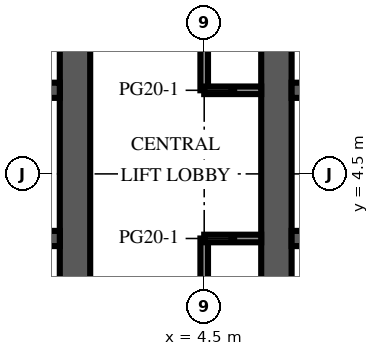
"""IFC4 building model, lengths in metres.
Left out: names, types, materials, properties, quantities, classifications, styles, units other than length and angle.
Written with IfcOpenShell. Run it as: python <this file> out.ifc"""

import sys

from ifc_helpers import new_model, si_unit, direction, frame, frame_2d, origin, place, context, subcontext, project, spatial, rectangle, extrude, element, fill, save


model = new_model("IFC4")
c1 = context("Model", 3, precision=1e-05, world=origin(), true_north=direction((0.0, 1.0)))
c2 = subcontext(c1, "Body", "Model", "MODEL_VIEW")
j1 = project(units=[si_unit("LENGTHUNIT", "METRE"), si_unit("PLANEANGLEUNIT", "RADIAN")], contexts=[c1])
p1 = place(None, origin())
s1 = spatial("IfcSite", under=j1, at=p1, CompositionType="ELEMENT")
p2 = place(p1, origin())
s2 = spatial("IfcBuilding", under=s1, at=p2, CompositionType="ELEMENT")
p3 = place(p2, frame((0.0, 0.0, 191.5)))
s3 = spatial("IfcBuildingStorey", under=s2, at=p3, CompositionType="ELEMENT", Elevation=191.5)
p4 = place(p3, frame((1.1, -9.0, 0.0), z_axis=(0.0, 0.0, 1.0), x_axis=(0.0, 1.0, 0.0)))
e1 = element("IfcWall", 1, at=p4, inside=s3, PredefinedType="SHEAR", context=c2, shape_type="SweptSolid", body=[
    extrude(rectangle(XDim=27.5, YDim=0.8, at=frame_2d((13.75, 0.0))), origin(), (0.0, 0.0, 1.0), 4.1),
])
p5 = place(p4, frame((12.55, 0.0, 0.0)))
e2 = element("IfcOpeningElement", 2, at=p5, cuts=e1, PredefinedType="OPENING", context=c2, shape_type="SweptSolid", body=[
    extrude(rectangle(XDim=2.4, YDim=2.4, at=frame_2d((1.2, 1.2))), frame((0.0, 0.41, 0.0), z_axis=(0.0, -1.0, 0.0), x_axis=(1.0, 0.0, 0.0)), (0.0, 0.0, 1.0), 0.82),
])
p6 = place(p4, frame((3.95, 0.0, 0.0)))
e3 = element("IfcOpeningElement", 3, at=p6, cuts=e1, PredefinedType="OPENING", context=c2, shape_type="SweptSolid", body=[
    extrude(rectangle(XDim=1.2, YDim=2.1, at=frame_2d((0.6, 1.05))), frame((0.0, 0.41, 0.0), z_axis=(0.0, -1.0, 0.0), x_axis=(1.0, 0.0, 0.0)), (0.0, 0.0, 1.0), 0.82),
])
p7 = place(p4, frame((19.45, 0.0, 0.0)))
e4 = element("IfcOpeningElement", 4, at=p7, cuts=e1, PredefinedType="OPENING", context=c2, shape_type="SweptSolid", body=[
    extrude(rectangle(XDim=1.0, YDim=2.1, at=frame_2d((0.5, 1.05))), frame((0.0, 0.41, 0.0), z_axis=(0.0, -1.0, 0.0), x_axis=(1.0, 0.0, 0.0)), (0.0, 0.0, 1.0), 0.82),
])
p8 = place(p4, frame((21.137, 0.0, 0.0)))
e5 = element("IfcOpeningElement", 5, at=p8, cuts=e1, PredefinedType="OPENING", context=c2, shape_type="SweptSolid", body=[
    extrude(rectangle(XDim=1.0, YDim=2.1, at=frame_2d((0.5, 1.05))), frame((0.0, 0.41, 0.0), z_axis=(0.0, -1.0, 0.0), x_axis=(1.0, 0.0, 0.0)), (0.0, 0.0, 1.0), 0.82),
])
p9 = place(p4, frame((23.2, 0.0, 0.0)))
e6 = element("IfcOpeningElement", 6, at=p9, cuts=e1, PredefinedType="OPENING", context=c2, shape_type="SweptSolid", body=[
    extrude(rectangle(XDim=1.0, YDim=2.1, at=frame_2d((0.5, 1.05))), frame((0.0, 0.41, 0.0), z_axis=(0.0, -1.0, 0.0), x_axis=(1.0, 0.0, 0.0)), (0.0, 0.0, 1.0), 0.82),
])
p10 = place(p4, frame((25.262, 0.0, 0.0)))
e7 = element("IfcOpeningElement", 7, at=p10, cuts=e1, PredefinedType="OPENING", context=c2, shape_type="SweptSolid", body=[
    extrude(rectangle(XDim=1.0, YDim=2.1, at=frame_2d((0.5, 1.05))), frame((0.0, 0.41, 0.0), z_axis=(0.0, -1.0, 0.0), x_axis=(1.0, 0.0, 0.0)), (0.0, 0.0, 1.0), 0.82),
])
p11 = place(p3, frame((-9.7, 2.8, 0.0), z_axis=(0.0, 0.0, 1.0), x_axis=(1.0, 0.0, 0.0)))
e8 = element("IfcWall", 8, at=p11, inside=s3, PredefinedType="SHEAR", context=c2, shape_type="SweptSolid", body=[
    extrude(rectangle(XDim=10.4, YDim=0.4, at=frame_2d((5.2, 0.0))), origin(), (0.0, 0.0, 1.0), 4.1),
])
p12 = place(p11, frame((0.738, 0.0, 0.0)))
e9 = element("IfcOpeningElement", 9, at=p12, cuts=e8, PredefinedType="OPENING", context=c2, shape_type="SweptSolid", body=[
    extrude(rectangle(XDim=1.1, YDim=2.1, at=frame_2d((0.55, 1.05))), frame((0.0, 0.21, 0.0), z_axis=(0.0, -1.0, 0.0), x_axis=(1.0, 0.0, 0.0)), (0.0, 0.0, 1.0), 0.42),
])
p13 = place(p11, frame((3.337, 0.0, 0.0)))
e10 = element("IfcOpeningElement", 10, at=p13, cuts=e8, PredefinedType="OPENING", context=c2, shape_type="SweptSolid", body=[
    extrude(rectangle(XDim=1.1, YDim=2.1, at=frame_2d((0.55, 1.05))), frame((0.0, 0.21, 0.0), z_axis=(0.0, -1.0, 0.0), x_axis=(1.0, 0.0, 0.0)), (0.0, 0.0, 1.0), 0.42),
])
p14 = place(p11, frame((6.012, 0.0, 0.0)))
e11 = element("IfcOpeningElement", 11, at=p14, cuts=e8, PredefinedType="OPENING", context=c2, shape_type="SweptSolid", body=[
    extrude(rectangle(XDim=1.0, YDim=2.1, at=frame_2d((0.5, 1.05))), frame((0.0, 0.21, 0.0), z_axis=(0.0, -1.0, 0.0), x_axis=(1.0, 0.0, 0.0)), (0.0, 0.0, 1.0), 0.42),
])
p15 = place(p11, frame((8.613, 0.0, 0.0)))
e12 = element("IfcOpeningElement", 12, at=p15, cuts=e8, PredefinedType="OPENING", context=c2, shape_type="SweptSolid", body=[
    extrude(rectangle(XDim=1.0, YDim=2.1, at=frame_2d((0.5, 1.05))), frame((0.0, 0.21, 0.0), z_axis=(0.0, -1.0, 0.0), x_axis=(1.0, 0.0, 0.0)), (0.0, 0.0, 1.0), 0.42),
])
p16 = place(p3, frame((-9.7, 6.7, 0.0), z_axis=(0.0, 0.0, 1.0), x_axis=(1.0, 0.0, 0.0)))
e13 = element("IfcWall", 13, at=p16, inside=s3, PredefinedType="SHEAR", context=c2, shape_type="SweptSolid", body=[
    extrude(rectangle(XDim=10.4, YDim=0.4, at=frame_2d((5.2, 0.0))), origin(), (0.0, 0.0, 1.0), 4.1),
])
p17 = place(p16, frame((3.337, 0.0, 0.0)))
e14 = element("IfcOpeningElement", 14, at=p17, cuts=e13, PredefinedType="OPENING", context=c2, shape_type="SweptSolid", body=[
    extrude(rectangle(XDim=1.1, YDim=2.1, at=frame_2d((0.55, 1.05))), frame((0.0, 0.21, 0.0), z_axis=(0.0, -1.0, 0.0), x_axis=(1.0, 0.0, 0.0)), (0.0, 0.0, 1.0), 0.42),
])
p18 = place(p16, frame((5.962, 0.0, 0.0)))
e15 = element("IfcOpeningElement", 15, at=p18, cuts=e13, PredefinedType="OPENING", context=c2, shape_type="SweptSolid", body=[
    extrude(rectangle(XDim=1.1, YDim=2.1, at=frame_2d((0.55, 1.05))), frame((0.0, 0.21, 0.0), z_axis=(0.0, -1.0, 0.0), x_axis=(1.0, 0.0, 0.0)), (0.0, 0.0, 1.0), 0.42),
])
p19 = place(p16, frame((8.663, 0.0, 0.0)))
e16 = element("IfcOpeningElement", 16, at=p19, cuts=e13, PredefinedType="OPENING", context=c2, shape_type="SweptSolid", body=[
    extrude(rectangle(XDim=1.1, YDim=2.1, at=frame_2d((0.55, 1.05))), frame((0.0, 0.21, 0.0), z_axis=(0.0, -1.0, 0.0), x_axis=(1.0, 0.0, 0.0)), (0.0, 0.0, 1.0), 0.42),
])
p20 = place(p16, frame((0.688, 0.0, 0.0)))
e17 = element("IfcOpeningElement", 17, at=p20, cuts=e13, PredefinedType="OPENING", context=c2, shape_type="SweptSolid", body=[
    extrude(rectangle(XDim=1.0, YDim=2.1, at=frame_2d((0.5, 1.05))), frame((0.0, 0.21, 0.0), z_axis=(0.0, -1.0, 0.0), x_axis=(1.0, 0.0, 0.0)), (0.0, 0.0, 1.0), 0.42),
])
p21 = place(p3, frame((6.4, -9.0, 0.0), z_axis=(0.0, 0.0, 1.0), x_axis=(0.0, 1.0, 0.0)))
e18 = element("IfcWall", 18, at=p21, inside=s3, PredefinedType="SHEAR", context=c2, shape_type="SweptSolid", body=[
    extrude(rectangle(XDim=27.5, YDim=0.8, at=frame_2d((13.75, 0.0))), origin(), (0.0, 0.0, 1.0), 4.1),
])
p22 = place(p21, frame((12.55, 0.0, 0.0)))
e19 = element("IfcOpeningElement", 19, at=p22, cuts=e18, PredefinedType="OPENING", context=c2, shape_type="SweptSolid", body=[
    extrude(rectangle(XDim=2.4, YDim=2.4, at=frame_2d((1.2, 1.2))), frame((0.0, 0.41, 0.0), z_axis=(0.0, -1.0, 0.0), x_axis=(1.0, 0.0, 0.0)), (0.0, 0.0, 1.0), 0.82),
])
p23 = place(p21, frame((3.95, 0.0, 0.0)))
e20 = element("IfcOpeningElement", 20, at=p23, cuts=e18, PredefinedType="OPENING", context=c2, shape_type="SweptSolid", body=[
    extrude(rectangle(XDim=1.2, YDim=2.1, at=frame_2d((0.6, 1.05))), frame((0.0, 0.41, 0.0), z_axis=(0.0, -1.0, 0.0), x_axis=(1.0, 0.0, 0.0)), (0.0, 0.0, 1.0), 0.82),
])
p24 = place(p21, frame((19.45, 0.0, 0.0)))
e21 = element("IfcOpeningElement", 21, at=p24, cuts=e18, PredefinedType="OPENING", context=c2, shape_type="SweptSolid", body=[
    extrude(rectangle(XDim=1.0, YDim=2.1, at=frame_2d((0.5, 1.05))), frame((0.0, 0.41, 0.0), z_axis=(0.0, -1.0, 0.0), x_axis=(1.0, 0.0, 0.0)), (0.0, 0.0, 1.0), 0.82),
])
p25 = place(p21, frame((21.137, 0.0, 0.0)))
e22 = element("IfcOpeningElement", 22, at=p25, cuts=e18, PredefinedType="OPENING", context=c2, shape_type="SweptSolid", body=[
    extrude(rectangle(XDim=1.0, YDim=2.1, at=frame_2d((0.5, 1.05))), frame((0.0, 0.41, 0.0), z_axis=(0.0, -1.0, 0.0), x_axis=(1.0, 0.0, 0.0)), (0.0, 0.0, 1.0), 0.82),
])
p26 = place(p21, frame((23.2, 0.0, 0.0)))
e23 = element("IfcOpeningElement", 23, at=p26, cuts=e18, PredefinedType="OPENING", context=c2, shape_type="SweptSolid", body=[
    extrude(rectangle(XDim=1.0, YDim=2.1, at=frame_2d((0.5, 1.05))), frame((0.0, 0.41, 0.0), z_axis=(0.0, -1.0, 0.0), x_axis=(1.0, 0.0, 0.0)), (0.0, 0.0, 1.0), 0.82),
])
p27 = place(p21, frame((25.262, 0.0, 0.0)))
e24 = element("IfcOpeningElement", 24, at=p27, cuts=e18, PredefinedType="OPENING", context=c2, shape_type="SweptSolid", body=[
    extrude(rectangle(XDim=1.0, YDim=2.1, at=frame_2d((0.5, 1.05))), frame((0.0, 0.41, 0.0), z_axis=(0.0, -1.0, 0.0), x_axis=(1.0, 0.0, 0.0)), (0.0, 0.0, 1.0), 0.82),
])
p28 = place(p3, frame((6.8, 2.8, 0.0), z_axis=(0.0, 0.0, 1.0), x_axis=(1.0, 0.0, 0.0)))
e25 = element("IfcWall", 25, at=p28, inside=s3, PredefinedType="SHEAR", context=c2, shape_type="SweptSolid", body=[
    extrude(rectangle(XDim=10.4, YDim=0.4, at=frame_2d((5.2, 0.0))), origin(), (0.0, 0.0, 1.0), 4.1),
])
p29 = place(p28, frame((0.738, 0.0, 0.0)))
e26 = element("IfcOpeningElement", 26, at=p29, cuts=e25, PredefinedType="OPENING", context=c2, shape_type="SweptSolid", body=[
    extrude(rectangle(XDim=1.1, YDim=2.1, at=frame_2d((0.55, 1.05))), frame((0.0, 0.21, 0.0), z_axis=(0.0, -1.0, 0.0), x_axis=(1.0, 0.0, 0.0)), (0.0, 0.0, 1.0), 0.42),
])
p30 = place(p28, frame((3.337, 0.0, 0.0)))
e27 = element("IfcOpeningElement", 27, at=p30, cuts=e25, PredefinedType="OPENING", context=c2, shape_type="SweptSolid", body=[
    extrude(rectangle(XDim=1.1, YDim=2.1, at=frame_2d((0.55, 1.05))), frame((0.0, 0.21, 0.0), z_axis=(0.0, -1.0, 0.0), x_axis=(1.0, 0.0, 0.0)), (0.0, 0.0, 1.0), 0.42),
])
p31 = place(p28, frame((6.012, 0.0, 0.0)))
e28 = element("IfcOpeningElement", 28, at=p31, cuts=e25, PredefinedType="OPENING", context=c2, shape_type="SweptSolid", body=[
    extrude(rectangle(XDim=1.0, YDim=2.1, at=frame_2d((0.5, 1.05))), frame((0.0, 0.21, 0.0), z_axis=(0.0, -1.0, 0.0), x_axis=(1.0, 0.0, 0.0)), (0.0, 0.0, 1.0), 0.42),
])
p32 = place(p28, frame((8.613, 0.0, 0.0)))
e29 = element("IfcOpeningElement", 29, at=p32, cuts=e25, PredefinedType="OPENING", context=c2, shape_type="SweptSolid", body=[
    extrude(rectangle(XDim=1.0, YDim=2.1, at=frame_2d((0.5, 1.05))), frame((0.0, 0.21, 0.0), z_axis=(0.0, -1.0, 0.0), x_axis=(1.0, 0.0, 0.0)), (0.0, 0.0, 1.0), 0.42),
])
p33 = place(p3, frame((6.8, 6.7, 0.0), z_axis=(0.0, 0.0, 1.0), x_axis=(1.0, 0.0, 0.0)))
e30 = element("IfcWall", 30, at=p33, inside=s3, PredefinedType="SHEAR", context=c2, shape_type="SweptSolid", body=[
    extrude(rectangle(XDim=10.4, YDim=0.4, at=frame_2d((5.2, 0.0))), origin(), (0.0, 0.0, 1.0), 4.1),
])
p34 = place(p33, frame((3.337, 0.0, 0.0)))
e31 = element("IfcOpeningElement", 31, at=p34, cuts=e30, PredefinedType="OPENING", context=c2, shape_type="SweptSolid", body=[
    extrude(rectangle(XDim=1.1, YDim=2.1, at=frame_2d((0.55, 1.05))), frame((0.0, 0.21, 0.0), z_axis=(0.0, -1.0, 0.0), x_axis=(1.0, 0.0, 0.0)), (0.0, 0.0, 1.0), 0.42),
])
p35 = place(p33, frame((5.962, 0.0, 0.0)))
e32 = element("IfcOpeningElement", 32, at=p35, cuts=e30, PredefinedType="OPENING", context=c2, shape_type="SweptSolid", body=[
    extrude(rectangle(XDim=1.1, YDim=2.1, at=frame_2d((0.55, 1.05))), frame((0.0, 0.21, 0.0), z_axis=(0.0, -1.0, 0.0), x_axis=(1.0, 0.0, 0.0)), (0.0, 0.0, 1.0), 0.42),
])
p36 = place(p33, frame((8.663, 0.0, 0.0)))
e33 = element("IfcOpeningElement", 33, at=p36, cuts=e30, PredefinedType="OPENING", context=c2, shape_type="SweptSolid", body=[
    extrude(rectangle(XDim=1.1, YDim=2.1, at=frame_2d((0.55, 1.05))), frame((0.0, 0.21, 0.0), z_axis=(0.0, -1.0, 0.0), x_axis=(1.0, 0.0, 0.0)), (0.0, 0.0, 1.0), 0.42),
])
p37 = place(p33, frame((0.688, 0.0, 0.0)))
e34 = element("IfcOpeningElement", 34, at=p37, cuts=e30, PredefinedType="OPENING", context=c2, shape_type="SweptSolid", body=[
    extrude(rectangle(XDim=1.0, YDim=2.1, at=frame_2d((0.5, 1.05))), frame((0.0, 0.21, 0.0), z_axis=(0.0, -1.0, 0.0), x_axis=(1.0, 0.0, 0.0)), (0.0, 0.0, 1.0), 0.42),
])
p38 = place(p3, frame((4.5, 2.8, 0.0), z_axis=(0.0, 0.0, 1.0), x_axis=(0.0, -1.0, 0.0)))
e35 = element("IfcWall", 35, at=p38, inside=s3, PredefinedType="PARTITIONING", context=c2, shape_type="SweptSolid", body=[
    extrude(rectangle(XDim=6.3, YDim=0.2, at=frame_2d((3.15, 0.0))), origin(), (0.0, 0.0, 1.0), 3.65),
])
p39 = place(p38, frame((2.2, 0.0, 0.0)))
e36 = element("IfcOpeningElement", 36, at=p39, cuts=e35, PredefinedType="OPENING", context=c2, shape_type="SweptSolid", body=[
    extrude(rectangle(XDim=1.0, YDim=2.1, at=frame_2d((0.5, 1.05))), frame((0.0, 0.11, 0.0), z_axis=(0.0, -1.0, 0.0), x_axis=(1.0, 0.0, 0.0)), (0.0, 0.0, 1.0), 0.22),
])
p40 = place(p3, frame((4.5, 18.5, 0.0), z_axis=(0.0, 0.0, 1.0), x_axis=(0.0, -1.0, 0.0)))
e37 = element("IfcWall", 37, at=p40, inside=s3, PredefinedType="PARTITIONING", context=c2, shape_type="SweptSolid", body=[
    extrude(rectangle(XDim=11.8, YDim=0.2, at=frame_2d((5.9, 0.0))), origin(), (0.0, 0.0, 1.0), 3.65),
])
p41 = place(p40, frame((5.45, 0.0, 0.0)))
e38 = element("IfcOpeningElement", 38, at=p41, cuts=e37, PredefinedType="OPENING", context=c2, shape_type="SweptSolid", body=[
    extrude(rectangle(XDim=1.0, YDim=2.1, at=frame_2d((0.5, 1.05))), frame((0.0, 0.11, 0.0), z_axis=(0.0, -1.0, 0.0), x_axis=(1.0, 0.0, 0.0)), (0.0, 0.0, 1.0), 0.22),
])
for number, where, z_axis, x_axis in (
    (39, (4.5, 2.8, 0.0), (0.0, 0.0, 1.0), (1.0, 0.0, 0.0)),
    (40, (4.5, 6.7, 0.0), (0.0, 0.0, 1.0), (1.0, 0.0, 0.0)),
):
    element("IfcWall", number, at=place(p3, frame(where, z_axis=z_axis, x_axis=x_axis)), inside=s3, PredefinedType="PARTITIONING", context=c2, shape_type="SweptSolid", body=[
        extrude(rectangle(XDim=1.5, YDim=0.2, at=frame_2d((0.75, 0.0))), origin(), (0.0, 0.0, 1.0), 3.65),
    ])
p42 = place(p5, origin())
e41 = element("IfcDoor", 41, at=p42, inside=s3, OperationType="DOUBLE_DOOR_DOUBLE_SWING", PredefinedType="DOOR", context=c2, shape_type="SweptSolid", body=[
    extrude(rectangle(XDim=2.4, YDim=2.4, at=frame_2d((1.2, 1.2))), frame((0.0, 0.025, 0.0), z_axis=(0.0, -1.0, 0.0), x_axis=(1.0, 0.0, 0.0)), (0.0, 0.0, 1.0), 0.05),
])
fill(e2, e41)
p43 = place(p22, origin())
e42 = element("IfcDoor", 42, at=p43, inside=s3, OperationType="DOUBLE_DOOR_DOUBLE_SWING", PredefinedType="DOOR", context=c2, shape_type="SweptSolid", body=[
    extrude(rectangle(XDim=2.4, YDim=2.4, at=frame_2d((1.2, 1.2))), frame((0.0, 0.025, 0.0), z_axis=(0.0, -1.0, 0.0), x_axis=(1.0, 0.0, 0.0)), (0.0, 0.0, 1.0), 0.05),
])
fill(e19, e42)
save(model, sys.argv[1])
